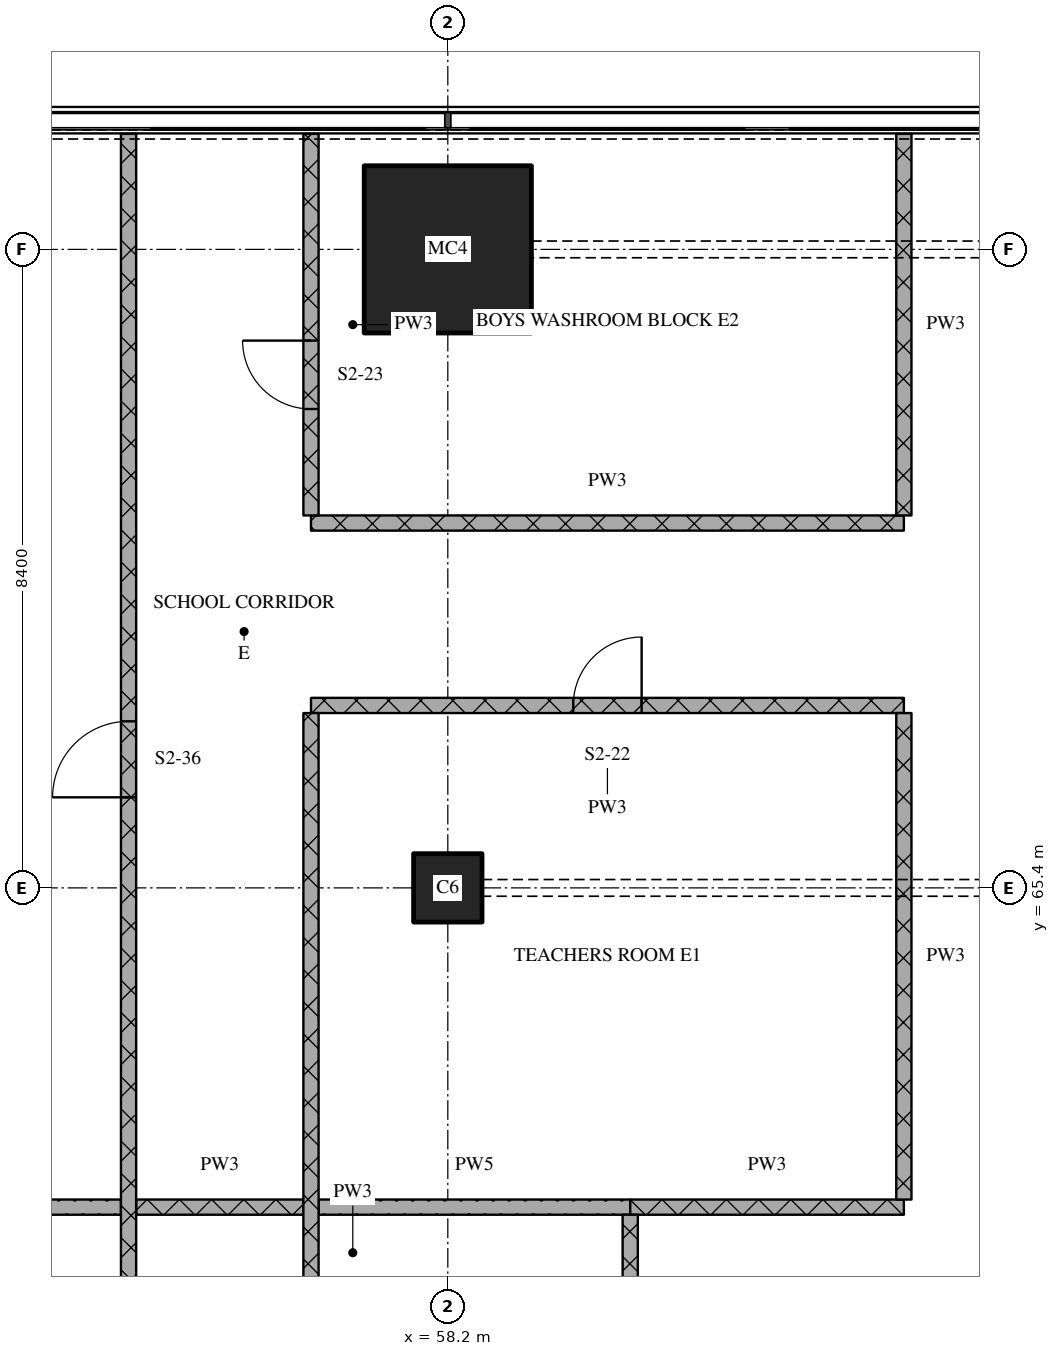
"""IFC4 building model, lengths in metres.
Left out: names, types, materials, properties, quantities, classifications, styles, units other than length and angle.
Written with IfcOpenShell. Run it as: python <this file> out.ifc"""

import sys

from ifc_helpers import new_model, si_unit, direction, frame, frame_2d, origin, origin_2d, place, context, subcontext, project, spatial, rectangle, extrude, element, fill, save


model = new_model("IFC4")
c1 = context("Model", 3, precision=1e-05, world=origin(), true_north=direction((0.0, 1.0)))
c2 = subcontext(c1, "Body", "Model", "MODEL_VIEW")
j1 = project(units=[si_unit("LENGTHUNIT", "METRE"), si_unit("PLANEANGLEUNIT", "RADIAN")], contexts=[c1])
p1 = place(None, origin())
s1 = spatial("IfcSite", under=j1, at=p1, CompositionType="ELEMENT")
p2 = place(p1, origin())
s2 = spatial("IfcBuilding", under=s1, at=p2, CompositionType="ELEMENT")
p3 = place(p2, frame((0.0, 0.0, 32.7)))
s3 = spatial("IfcBuildingStorey", under=s2, at=p3, CompositionType="ELEMENT", Elevation=32.7)
p4 = place(p3, frame((58.2, 65.4, 0.0), z_axis=(0.0, 0.0, 1.0), x_axis=(1.0, 0.0, 0.0)))
e1 = element("IfcColumn", 1, at=p4, inside=s3, PredefinedType="COLUMN", context=c2, shape_type="SweptSolid", body=[
    extrude(rectangle(XDim=0.9, YDim=0.9, at=origin_2d()), origin(), (0.0, 0.0, 1.0), 4.5),
])
p5 = place(p3, frame((58.2, 73.8, 0.0), z_axis=(0.0, 0.0, 1.0), x_axis=(1.0, 0.0, 0.0)))
e2 = element("IfcColumn", 2, at=p5, inside=s3, PredefinedType="COLUMN", context=c2, shape_type="SweptSolid", body=[
    extrude(rectangle(XDim=2.2, YDim=2.2, at=origin_2d()), origin(), (0.0, 0.0, 1.0), 4.5),
])
p6 = place(p3, frame((54.1, 61.2, 0.0), z_axis=(0.0, 0.0, 1.0), x_axis=(1.0, 0.0, 0.0)))
e3 = element("IfcWall", 3, at=p6, inside=s3, PredefinedType="PARTITIONING", context=c2, shape_type="SweptSolid", body=[
    extrude(rectangle(XDim=2.2, YDim=0.2, at=frame_2d((1.1, 0.0))), origin(), (0.0, 0.0, 1.0), 4.22),
])
p7 = place(p3, frame((60.6, 61.2, 0.0), z_axis=(0.0, 0.0, 1.0), x_axis=(1.0, 0.0, 0.0)))
e4 = element("IfcWall", 4, at=p7, inside=s3, PredefinedType="PARTITIONING", context=c2, shape_type="SweptSolid", body=[
    extrude(rectangle(XDim=3.6, YDim=0.2, at=frame_2d((1.8, 0.0))), origin(), (0.0, 0.0, 1.0), 4.22),
])
p8 = place(p3, frame((48.28, 61.2, 0.0), z_axis=(0.0, 0.0, 1.0), x_axis=(1.0, 0.0, 0.0)))
e5 = element("IfcWall", 5, at=p8, inside=s3, PredefinedType="PARTITIONING", context=c2, shape_type="SweptSolid", body=[
    extrude(rectangle(XDim=5.62, YDim=0.2, at=frame_2d((2.81, 0.0))), origin(), (0.0, 0.0, 1.0), 4.22),
])
p9 = place(p3, frame((56.5, 61.2, 0.0), z_axis=(0.0, 0.0, 1.0), x_axis=(1.0, 0.0, 0.0)))
e6 = element("IfcWall", 6, at=p9, inside=s3, PredefinedType="PARTITIONING", context=c2, shape_type="SweptSolid", body=[
    extrude(rectangle(XDim=4.1, YDim=0.2, at=frame_2d((2.05, 0.0))), origin(), (0.0, 0.0, 1.0), 4.22),
])
p10 = place(p3, frame((64.2, 67.8, 0.0), z_axis=(0.0, 0.0, 1.0), x_axis=(-1.0, 0.0, 0.0)))
e7 = element("IfcWall", 7, at=p10, inside=s3, PredefinedType="PARTITIONING", context=c2, shape_type="SweptSolid", body=[
    extrude(rectangle(XDim=7.8, YDim=0.2, at=frame_2d((3.9, 0.0))), origin(), (0.0, 0.0, 1.0), 4.22),
])
p11 = place(p10, frame((3.45, 0.0, 0.0)))
e8 = element("IfcOpeningElement", 8, at=p11, cuts=e7, PredefinedType="OPENING", context=c2, shape_type="SweptSolid", body=[
    extrude(rectangle(XDim=0.9, YDim=2.1, at=frame_2d((0.45, 1.05))), frame((0.0, 0.11, 0.0), z_axis=(0.0, -1.0, 0.0), x_axis=(1.0, 0.0, 0.0)), (0.0, 0.0, 1.0), 0.22),
])
p12 = place(p3, frame((56.4, 70.2, 0.0), z_axis=(0.0, 0.0, 1.0), x_axis=(1.0, 0.0, 0.0)))
e9 = element("IfcWall", 9, at=p12, inside=s3, PredefinedType="PARTITIONING", context=c2, shape_type="SweptSolid", body=[
    extrude(rectangle(XDim=7.8, YDim=0.2, at=frame_2d((3.9, 0.0))), origin(), (0.0, 0.0, 1.0), 4.22),
])
p13 = place(p3, frame((54.0, 43.3, 0.0), z_axis=(0.0, 0.0, 1.0), x_axis=(0.0, 1.0, 0.0)))
e10 = element("IfcWall", 10, at=p13, inside=s3, PredefinedType="PARTITIONING", context=c2, shape_type="SweptSolid", body=[
    extrude(rectangle(XDim=32.02, YDim=0.2, at=frame_2d((16.01, 0.0))), origin(), (0.0, 0.0, 1.0), 4.22),
])
p14 = place(p13, frame((8.4, 0.0, 0.0)))
e11 = element("IfcOpeningElement", 11, at=p14, cuts=e10, PredefinedType="OPENING", context=c2, shape_type="SweptSolid", body=[
    extrude(rectangle(XDim=1.0, YDim=2.1, at=frame_2d((0.5, 1.05))), frame((0.0, 0.11, 0.0), z_axis=(0.0, -1.0, 0.0), x_axis=(1.0, 0.0, 0.0)), (0.0, 0.0, 1.0), 0.22),
])
p15 = place(p13, frame((23.292, 0.0, 0.0)))
e12 = element("IfcOpeningElement", 12, at=p15, cuts=e10, PredefinedType="OPENING", context=c2, shape_type="SweptSolid", body=[
    extrude(rectangle(XDim=1.0, YDim=2.1, at=frame_2d((0.5, 1.05))), frame((0.0, 0.11, 0.0), z_axis=(0.0, -1.0, 0.0), x_axis=(1.0, 0.0, 0.0)), (0.0, 0.0, 1.0), 0.22),
])
p16 = place(p3, frame((56.4, 67.7, 0.0), z_axis=(0.0, 0.0, 1.0), x_axis=(0.0, -1.0, 0.0)))
e13 = element("IfcWall", 13, at=p16, inside=s3, PredefinedType="PARTITIONING", context=c2, shape_type="SweptSolid", body=[
    extrude(rectangle(XDim=14.2, YDim=0.2, at=frame_2d((7.1, 0.0))), origin(), (0.0, 0.0, 1.0), 4.22),
])
p17 = place(p16, frame((7.55, 0.0, 0.0)))
e14 = element("IfcOpeningElement", 14, at=p17, cuts=e13, PredefinedType="OPENING", context=c2, shape_type="SweptSolid", body=[
    extrude(rectangle(XDim=0.9, YDim=2.1, at=frame_2d((0.45, 1.05))), frame((0.0, 0.11, 0.0), z_axis=(0.0, -1.0, 0.0), x_axis=(1.0, 0.0, 0.0)), (0.0, 0.0, 1.0), 0.22),
])
p18 = place(p16, frame((11.45, 0.0, 0.0)))
e15 = element("IfcOpeningElement", 15, at=p18, cuts=e13, PredefinedType="OPENING", context=c2, shape_type="SweptSolid", body=[
    extrude(rectangle(XDim=0.9, YDim=2.1, at=frame_2d((0.45, 1.05))), frame((0.0, 0.11, 0.0), z_axis=(0.0, -1.0, 0.0), x_axis=(1.0, 0.0, 0.0)), (0.0, 0.0, 1.0), 0.22),
])
p19 = place(p3, frame((56.4, 75.32, 0.0), z_axis=(0.0, 0.0, 1.0), x_axis=(0.0, -1.0, 0.0)))
e16 = element("IfcWall", 16, at=p19, inside=s3, PredefinedType="PARTITIONING", context=c2, shape_type="SweptSolid", body=[
    extrude(rectangle(XDim=5.02, YDim=0.2, at=frame_2d((2.51, 0.0))), origin(), (0.0, 0.0, 1.0), 4.22),
])
p20 = place(p19, frame((2.72, 0.0, 0.0)))
e17 = element("IfcOpeningElement", 17, at=p20, cuts=e16, PredefinedType="OPENING", context=c2, shape_type="SweptSolid", body=[
    extrude(rectangle(XDim=0.9, YDim=2.1, at=frame_2d((0.45, 1.05))), frame((0.0, 0.11, 0.0), z_axis=(0.0, -1.0, 0.0), x_axis=(1.0, 0.0, 0.0)), (0.0, 0.0, 1.0), 0.22),
])
p21 = place(p3, frame((60.6, 61.1, 0.0), z_axis=(0.0, 0.0, 1.0), x_axis=(0.0, -1.0, 0.0)))
e18 = element("IfcWall", 18, at=p21, inside=s3, PredefinedType="PARTITIONING", context=c2, shape_type="SweptSolid", body=[
    extrude(rectangle(XDim=7.6, YDim=0.2, at=frame_2d((3.8, 0.0))), origin(), (0.0, 0.0, 1.0), 4.22),
])
p22 = place(p3, frame((64.2, 67.7, 0.0), z_axis=(0.0, 0.0, 1.0), x_axis=(0.0, -1.0, 0.0)))
e19 = element("IfcWall", 19, at=p22, inside=s3, PredefinedType="PARTITIONING", context=c2, shape_type="SweptSolid", body=[
    extrude(rectangle(XDim=6.4, YDim=0.2, at=frame_2d((3.2, 0.0))), origin(), (0.0, 0.0, 1.0), 4.22),
])
p23 = place(p3, frame((64.2, 75.32, 0.0), z_axis=(0.0, 0.0, 1.0), x_axis=(0.0, -1.0, 0.0)))
e20 = element("IfcWall", 20, at=p23, inside=s3, PredefinedType="PARTITIONING", context=c2, shape_type="SweptSolid", body=[
    extrude(rectangle(XDim=5.02, YDim=0.2, at=frame_2d((2.51, 0.0))), origin(), (0.0, 0.0, 1.0), 4.22),
])
p24 = place(p11, origin())
e21 = element("IfcDoor", 21, at=p24, inside=s3, OperationType="SINGLE_SWING_RIGHT", PredefinedType="DOOR", context=c2, shape_type="SweptSolid", body=[
    extrude(rectangle(XDim=0.9, YDim=2.1, at=frame_2d((0.45, 1.05))), frame((0.0, 0.025, 0.0), z_axis=(0.0, -1.0, 0.0), x_axis=(1.0, 0.0, 0.0)), (0.0, 0.0, 1.0), 0.05),
])
fill(e8, e21)
p25 = place(p15, origin())
e22 = element("IfcDoor", 22, at=p25, inside=s3, OperationType="SINGLE_SWING_LEFT", PredefinedType="DOOR", context=c2, shape_type="SweptSolid", body=[
    extrude(rectangle(XDim=1.0, YDim=2.1, at=frame_2d((0.5, 1.05))), frame((0.0, 0.025, 0.0), z_axis=(0.0, -1.0, 0.0), x_axis=(1.0, 0.0, 0.0)), (0.0, 0.0, 1.0), 0.05),
])
fill(e12, e22)
p26 = place(p20, origin())
e23 = element("IfcDoor", 23, at=p26, inside=s3, OperationType="SINGLE_SWING_RIGHT", PredefinedType="DOOR", context=c2, shape_type="SweptSolid", body=[
    extrude(rectangle(XDim=0.9, YDim=2.1, at=frame_2d((0.45, 1.05))), frame((0.0, 0.025, 0.0), z_axis=(0.0, -1.0, 0.0), x_axis=(1.0, 0.0, 0.0)), (0.0, 0.0, 1.0), 0.05),
])
fill(e17, e23)
save(model, sys.argv[1])
